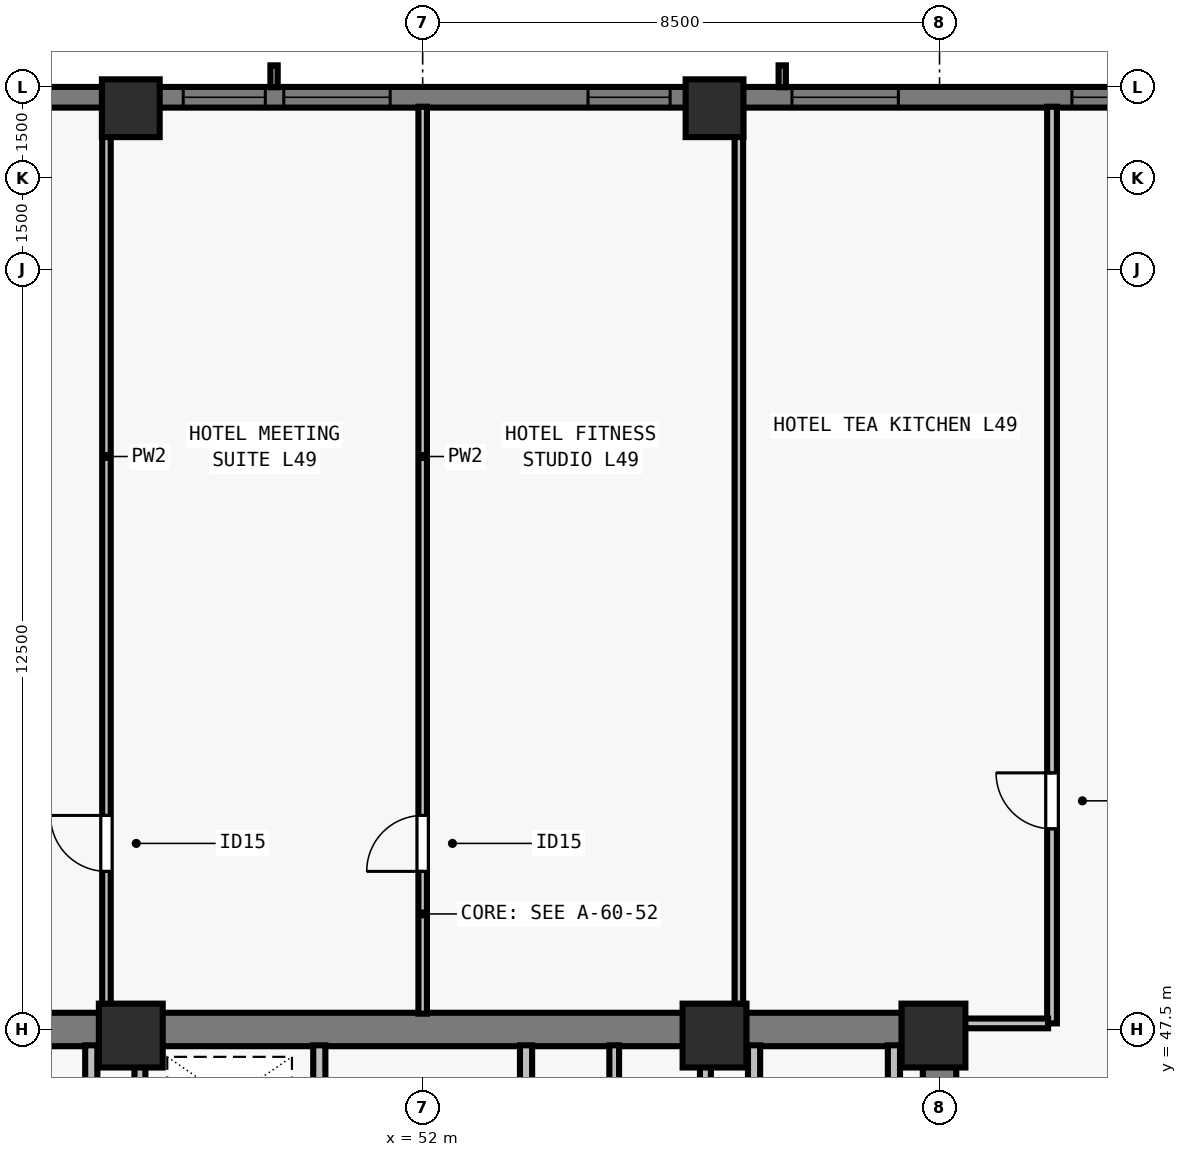
"""IFC4 building model, lengths in metres.
Left out: names, types, materials, properties, quantities, classifications, styles, units other than length and angle.
Written with IfcOpenShell. Run it as: python <this file> out.ifc"""

import sys

from ifc_helpers import new_model, si_unit, direction, frame, frame_2d, origin, origin_2d, place, context, subcontext, project, spatial, rectangle, extrude, element, fill, save


model = new_model("IFC4")
c1 = context("Model", 3, precision=1e-05, world=origin(), true_north=direction((0.0, 1.0)))
c2 = subcontext(c1, "Body", "Model", "MODEL_VIEW")
j1 = project(units=[si_unit("LENGTHUNIT", "METRE"), si_unit("PLANEANGLEUNIT", "RADIAN")], contexts=[c1])
p1 = place(None, origin())
s1 = spatial("IfcSite", under=j1, at=p1, CompositionType="ELEMENT")
p2 = place(p1, origin())
s2 = spatial("IfcBuilding", under=s1, at=p2, CompositionType="ELEMENT")
p3 = place(p2, frame((0.0, 0.0, 179.5)))
s3 = spatial("IfcBuildingStorey", under=s2, at=p3, CompositionType="ELEMENT", Elevation=179.5)
for number, where, z_axis, x_axis in (
    (1, (47.2, 47.4, 0.0), (0.0, 0.0, 1.0), (1.0, 0.0, 0.0)),
    (2, (56.8, 47.4, 0.0), (0.0, 0.0, 1.0), (1.0, 0.0, 0.0)),
    (3, (60.4, 47.4, 0.0), (0.0, 0.0, 1.0), (1.0, 0.0, 0.0)),
):
    element("IfcColumn", number, at=place(p3, frame(where, z_axis=z_axis, x_axis=x_axis)), inside=s3, PredefinedType="COLUMN", context=c2, shape_type="SweptSolid", body=[
        extrude(rectangle(XDim=1.05, YDim=1.05, at=origin_2d()), origin(), (0.0, 0.0, 1.0), 3.5),
    ])
for number, where, z_axis, x_axis in (
    (4, (56.8, 62.65, 0.0), (0.0, 0.0, 1.0), (1.0, 0.0, 0.0)),
    (5, (47.2, 62.65, 0.0), (0.0, 0.0, 1.0), (1.0, 0.0, 0.0)),
):
    element("IfcColumn", number, at=place(p3, frame(where, z_axis=z_axis, x_axis=x_axis)), inside=s3, PredefinedType="COLUMN", context=c2, shape_type="SweptSolid", body=[
        extrude(rectangle(XDim=0.95, YDim=0.95, at=origin_2d()), origin(), (0.0, 0.0, 1.0), 3.5),
    ])
p4 = place(p3, frame((32.0, 62.83, 0.0), z_axis=(0.0, 0.0, 1.0), x_axis=(1.0, 0.0, 0.0)))
e6 = element("IfcWall", 6, at=p4, inside=s3, PredefinedType="SOLIDWALL", context=c2, shape_type="SweptSolid", body=[
    extrude(rectangle(XDim=39.682, YDim=0.34, at=frame_2d((19.841, 0.0))), origin(), (0.0, 0.0, 1.0), 3.28),
])
p5 = place(p4, frame((3.902, 0.0, 0.8)))
e7 = element("IfcOpeningElement", 7, at=p5, cuts=e6, PredefinedType="OPENING", context=c2, shape_type="SweptSolid", body=[
    extrude(rectangle(XDim=1.75, YDim=1.66, at=frame_2d((0.875, 0.83))), frame((0.0, 0.18, 0.0), z_axis=(0.0, -1.0, 0.0), x_axis=(1.0, 0.0, 0.0)), (0.0, 0.0, 1.0), 0.36),
])
p6 = place(p4, frame((8.505, 0.0, 0.8)))
e8 = element("IfcOpeningElement", 8, at=p6, cuts=e6, PredefinedType="OPENING", context=c2, shape_type="SweptSolid", body=[
    extrude(rectangle(XDim=1.35, YDim=1.66, at=frame_2d((0.675, 0.83))), frame((0.0, 0.18, 0.0), z_axis=(0.0, -1.0, 0.0), x_axis=(1.0, 0.0, 0.0)), (0.0, 0.0, 1.0), 0.36),
])
p7 = place(p4, frame((11.859, 0.0, 0.8)))
e9 = element("IfcOpeningElement", 9, at=p7, cuts=e6, PredefinedType="OPENING", context=c2, shape_type="SweptSolid", body=[
    extrude(rectangle(XDim=1.75, YDim=1.66, at=frame_2d((0.875, 0.83))), frame((0.0, 0.18, 0.0), z_axis=(0.0, -1.0, 0.0), x_axis=(1.0, 0.0, 0.0)), (0.0, 0.0, 1.0), 0.36),
])
p8 = place(p4, frame((16.062, 0.0, 0.8)))
e10 = element("IfcOpeningElement", 10, at=p8, cuts=e6, PredefinedType="OPENING", context=c2, shape_type="SweptSolid", body=[
    extrude(rectangle(XDim=1.35, YDim=1.66, at=frame_2d((0.675, 0.83))), frame((0.0, 0.18, 0.0), z_axis=(0.0, -1.0, 0.0), x_axis=(1.0, 0.0, 0.0)), (0.0, 0.0, 1.0), 0.36),
])
p9 = place(p4, frame((17.716, 0.0, 0.8)))
e11 = element("IfcOpeningElement", 11, at=p9, cuts=e6, PredefinedType="OPENING", context=c2, shape_type="SweptSolid", body=[
    extrude(rectangle(XDim=1.75, YDim=1.66, at=frame_2d((0.875, 0.83))), frame((0.0, 0.18, 0.0), z_axis=(0.0, -1.0, 0.0), x_axis=(1.0, 0.0, 0.0)), (0.0, 0.0, 1.0), 0.36),
])
p10 = place(p4, frame((22.719, 0.0, 0.8)))
e12 = element("IfcOpeningElement", 12, at=p10, cuts=e6, PredefinedType="OPENING", context=c2, shape_type="SweptSolid", body=[
    extrude(rectangle(XDim=1.35, YDim=1.66, at=frame_2d((0.675, 0.83))), frame((0.0, 0.18, 0.0), z_axis=(0.0, -1.0, 0.0), x_axis=(1.0, 0.0, 0.0)), (0.0, 0.0, 1.0), 0.36),
])
p11 = place(p4, frame((26.073, 0.0, 0.8)))
e13 = element("IfcOpeningElement", 13, at=p11, cuts=e6, PredefinedType="OPENING", context=c2, shape_type="SweptSolid", body=[
    extrude(rectangle(XDim=1.75, YDim=1.66, at=frame_2d((0.875, 0.83))), frame((0.0, 0.18, 0.0), z_axis=(0.0, -1.0, 0.0), x_axis=(1.0, 0.0, 0.0)), (0.0, 0.0, 1.0), 0.36),
])
p12 = place(p4, frame((30.677, 0.0, 0.8)))
e14 = element("IfcOpeningElement", 14, at=p12, cuts=e6, PredefinedType="OPENING", context=c2, shape_type="SweptSolid", body=[
    extrude(rectangle(XDim=1.35, YDim=1.66, at=frame_2d((0.675, 0.83))), frame((0.0, 0.18, 0.0), z_axis=(0.0, -1.0, 0.0), x_axis=(1.0, 0.0, 0.0)), (0.0, 0.0, 1.0), 0.36),
])
p13 = place(p4, frame((33.18, 0.0, 0.8)))
e15 = element("IfcOpeningElement", 15, at=p13, cuts=e6, PredefinedType="OPENING", context=c2, shape_type="SweptSolid", body=[
    extrude(rectangle(XDim=1.75, YDim=1.66, at=frame_2d((0.875, 0.83))), frame((0.0, 0.18, 0.0), z_axis=(0.0, -1.0, 0.0), x_axis=(1.0, 0.0, 0.0)), (0.0, 0.0, 1.0), 0.36),
])
p14 = place(p3, frame((43.225, 47.5, 0.0), z_axis=(0.0, 0.0, 1.0), x_axis=(1.0, 0.0, 0.0)))
e16 = element("IfcWall", 16, at=p14, inside=s3, PredefinedType="SHEAR", context=c2, shape_type="SweptSolid", body=[
    extrude(rectangle(XDim=17.55, YDim=0.55, at=frame_2d((8.775, 0.0))), origin(), (0.0, 0.0, 1.0), 3.28),
])
p15 = place(p3, frame((60.5, 40.8, 0.0), z_axis=(0.0, 0.0, 1.0), x_axis=(0.0, 1.0, 0.0)))
e17 = element("IfcWall", 17, at=p15, inside=s3, PredefinedType="SHEAR", context=c2, shape_type="SweptSolid", body=[
    extrude(rectangle(XDim=6.435, YDim=0.55, at=frame_2d((3.218, 0.0))), origin(), (0.0, 0.0, 1.0), 3.28),
])
p16 = place(p3, frame((50.3, 40.585, 0.0), z_axis=(0.0, 0.0, 1.0), x_axis=(0.0, 1.0, 0.0)))
e18 = element("IfcWall", 18, at=p16, inside=s3, PredefinedType="SOLIDWALL", context=c2, shape_type="SweptSolid", body=[
    extrude(rectangle(XDim=6.655, YDim=0.2, at=frame_2d((3.328, 0.0))), origin(), (0.0, 0.0, 1.0), 3.28),
])
p17 = place(p16, frame((5.065, 0.0, 0.0)))
e19 = element("IfcOpeningElement", 19, at=p17, cuts=e18, PredefinedType="OPENING", context=c2, shape_type="SweptSolid", body=[
    extrude(rectangle(XDim=0.8, YDim=2.08, at=frame_2d((0.4, 1.04))), frame((0.0, 0.11, 0.0), z_axis=(0.0, -1.0, 0.0), x_axis=(1.0, 0.0, 0.0)), (0.0, 0.0, 1.0), 0.22),
])
p18 = place(p3, frame((53.7, 40.585, 0.0), z_axis=(0.0, 0.0, 1.0), x_axis=(0.0, 1.0, 0.0)))
e20 = element("IfcWall", 20, at=p18, inside=s3, PredefinedType="SOLIDWALL", context=c2, shape_type="SweptSolid", body=[
    extrude(rectangle(XDim=6.655, YDim=0.2, at=frame_2d((3.328, 0.0))), origin(), (0.0, 0.0, 1.0), 3.28),
])
p19 = place(p18, frame((0.195, 0.0, 0.0)))
e21 = element("IfcOpeningElement", 21, at=p19, cuts=e20, PredefinedType="OPENING", context=c2, shape_type="SweptSolid", body=[
    extrude(rectangle(XDim=0.8, YDim=2.08, at=frame_2d((0.4, 1.04))), frame((0.0, 0.11, 0.0), z_axis=(0.0, -1.0, 0.0), x_axis=(1.0, 0.0, 0.0)), (0.0, 0.0, 1.0), 0.22),
])
p20 = place(p18, frame((4.265, 0.0, 0.0)))
e22 = element("IfcOpeningElement", 22, at=p20, cuts=e20, PredefinedType="OPENING", context=c2, shape_type="SweptSolid", body=[
    extrude(rectangle(XDim=0.95, YDim=2.12, at=frame_2d((0.475, 1.06))), frame((0.0, 0.11, 0.0), z_axis=(0.0, -1.0, 0.0), x_axis=(1.0, 0.0, 0.0)), (0.0, 0.0, 1.0), 0.22),
])
for number, where, z_axis, x_axis in (
    (23, (46.55, 43.735, 0.0), (0.0, 0.0, 1.0), (0.0, 1.0, 0.0)),
    (24, (57.45, 43.735, 0.0), (0.0, 0.0, 1.0), (0.0, 1.0, 0.0)),
    (25, (59.75, 43.735, 0.0), (0.0, 0.0, 1.0), (0.0, 1.0, 0.0)),
):
    element("IfcWall", number, at=place(p3, frame(where, z_axis=z_axis, x_axis=x_axis)), inside=s3, PredefinedType="SOLIDWALL", context=c2, shape_type="SweptSolid", body=[
        extrude(rectangle(XDim=3.505, YDim=0.2, at=frame_2d((1.752, 0.0))), origin(), (0.0, 0.0, 1.0), 3.28),
    ])
for number, where, z_axis, x_axis in (
    (26, (47.35, 43.735, 0.0), (0.0, 0.0, 1.0), (0.0, 1.0, 0.0)),
    (27, (56.65, 43.735, 0.0), (0.0, 0.0, 1.0), (0.0, 1.0, 0.0)),
):
    element("IfcWall", number, at=place(p3, frame(where, z_axis=z_axis, x_axis=x_axis)), inside=s3, PredefinedType="SOLIDWALL", context=c2, shape_type="SweptSolid", body=[
        extrude(rectangle(XDim=3.505, YDim=0.18, at=frame_2d((1.752, 0.0))), origin(), (0.0, 0.0, 1.0), 3.28),
    ])
p21 = place(p3, frame((55.15, 44.195, 0.0), z_axis=(0.0, 0.0, 1.0), x_axis=(0.0, 1.0, 0.0)))
e28 = element("IfcWall", 28, at=p21, inside=s3, PredefinedType="PARTITIONING", context=c2, shape_type="SweptSolid", body=[
    extrude(rectangle(XDim=3.045, YDim=0.16, at=frame_2d((1.522, 0.0))), origin(), (0.0, 0.0, 1.0), 3.28),
])
p22 = place(p21, frame((1.025, 0.0, 0.0)))
e29 = element("IfcOpeningElement", 29, at=p22, cuts=e28, PredefinedType="OPENING", context=c2, shape_type="SweptSolid", body=[
    extrude(rectangle(XDim=0.8, YDim=2.1, at=frame_2d((0.4, 1.05))), frame((0.0, 0.09, 0.0), z_axis=(0.0, -1.0, 0.0), x_axis=(1.0, 0.0, 0.0)), (0.0, 0.0, 1.0), 0.18),
])
p23 = place(p3, frame((62.35, 47.6, 0.0), z_axis=(0.0, 0.0, 1.0), x_axis=(0.0, 1.0, 0.0)))
e30 = element("IfcWall", 30, at=p23, inside=s3, PredefinedType="PARTITIONING", context=c2, shape_type="SweptSolid", body=[
    extrude(rectangle(XDim=15.075, YDim=0.16, at=frame_2d((7.538, 0.0))), origin(), (0.0, 0.0, 1.0), 2.555),
])
p24 = place(p23, frame((3.2, 0.0, 0.0)))
e31 = element("IfcOpeningElement", 31, at=p24, cuts=e30, PredefinedType="OPENING", context=c2, shape_type="SweptSolid", body=[
    extrude(rectangle(XDim=0.92, YDim=2.12, at=frame_2d((0.46, 1.06))), frame((0.0, 0.09, 0.0), z_axis=(0.0, -1.0, 0.0), x_axis=(1.0, 0.0, 0.0)), (0.0, 0.0, 1.0), 0.18),
])
p25 = place(p3, frame((60.765, 47.6, 0.0), z_axis=(0.0, 0.0, 1.0), x_axis=(1.0, 0.0, 0.0)))
e32 = element("IfcWall", 32, at=p25, inside=s3, PredefinedType="PARTITIONING", context=c2, shape_type="SweptSolid", body=[
    extrude(rectangle(XDim=1.52, YDim=0.16, at=frame_2d((0.76, 0.0))), origin(), (0.0, 0.0, 1.0), 3.28),
])
p26 = place(p3, frame((46.8, 47.76, 0.0), z_axis=(0.0, 0.0, 1.0), x_axis=(0.0, 1.0, 0.0)))
e33 = element("IfcWall", 33, at=p26, inside=s3, PredefinedType="PARTITIONING", context=c2, shape_type="SweptSolid", body=[
    extrude(rectangle(XDim=14.915, YDim=0.14, at=frame_2d((7.458, 0.0))), origin(), (0.0, 0.0, 1.0), 3.28),
])
p27 = place(p26, frame((2.34, 0.0, 0.0)))
e34 = element("IfcOpeningElement", 34, at=p27, cuts=e33, PredefinedType="OPENING", context=c2, shape_type="SweptSolid", body=[
    extrude(rectangle(XDim=0.92, YDim=2.12, at=frame_2d((0.46, 1.06))), frame((0.0, 0.08, 0.0), z_axis=(0.0, -1.0, 0.0), x_axis=(1.0, 0.0, 0.0)), (0.0, 0.0, 1.0), 0.16),
])
p28 = place(p3, frame((52.0, 47.76, 0.0), z_axis=(0.0, 0.0, 1.0), x_axis=(0.0, 1.0, 0.0)))
e35 = element("IfcWall", 35, at=p28, inside=s3, PredefinedType="PARTITIONING", context=c2, shape_type="SweptSolid", body=[
    extrude(rectangle(XDim=14.915, YDim=0.14, at=frame_2d((7.458, 0.0))), origin(), (0.0, 0.0, 1.0), 2.896),
])
p29 = place(p28, frame((2.34, 0.0, 0.0)))
e36 = element("IfcOpeningElement", 36, at=p29, cuts=e35, PredefinedType="OPENING", context=c2, shape_type="SweptSolid", body=[
    extrude(rectangle(XDim=0.92, YDim=2.12, at=frame_2d((0.46, 1.06))), frame((0.0, 0.08, 0.0), z_axis=(0.0, -1.0, 0.0), x_axis=(1.0, 0.0, 0.0)), (0.0, 0.0, 1.0), 0.16),
])
p30 = place(p3, frame((57.2, 47.76, 0.0), z_axis=(0.0, 0.0, 1.0), x_axis=(0.0, 1.0, 0.0)))
e37 = element("IfcWall", 37, at=p30, inside=s3, PredefinedType="PARTITIONING", context=c2, shape_type="SweptSolid", body=[
    extrude(rectangle(XDim=14.915, YDim=0.14, at=frame_2d((7.458, 0.0))), origin(), (0.0, 0.0, 1.0), 3.28),
])
p31 = place(p8, origin())
e38 = element("IfcWindow", 38, at=p31, inside=s3, PartitioningType="SINGLE_PANEL", PredefinedType="WINDOW", context=c2, shape_type="SweptSolid", body=[
    extrude(rectangle(XDim=1.35, YDim=1.66, at=frame_2d((0.675, 0.83))), frame((0.0, -0.05, 0.0), z_axis=(0.0, -1.0, 0.0), x_axis=(1.0, 0.0, 0.0)), (0.0, 0.0, 1.0), 0.06),
])
fill(e10, e38)
p32 = place(p9, origin())
e39 = element("IfcWindow", 39, at=p32, inside=s3, PartitioningType="SINGLE_PANEL", PredefinedType="WINDOW", context=c2, shape_type="SweptSolid", body=[
    extrude(rectangle(XDim=1.75, YDim=1.66, at=frame_2d((0.875, 0.83))), frame((0.0, -0.05, 0.0), z_axis=(0.0, -1.0, 0.0), x_axis=(1.0, 0.0, 0.0)), (0.0, 0.0, 1.0), 0.06),
])
fill(e11, e39)
p33 = place(p10, origin())
e40 = element("IfcWindow", 40, at=p33, inside=s3, PartitioningType="SINGLE_PANEL", PredefinedType="WINDOW", context=c2, shape_type="SweptSolid", body=[
    extrude(rectangle(XDim=1.35, YDim=1.66, at=frame_2d((0.675, 0.83))), frame((0.0, -0.05, 0.0), z_axis=(0.0, -1.0, 0.0), x_axis=(1.0, 0.0, 0.0)), (0.0, 0.0, 1.0), 0.06),
])
fill(e12, e40)
p34 = place(p11, origin())
e41 = element("IfcWindow", 41, at=p34, inside=s3, PartitioningType="SINGLE_PANEL", PredefinedType="WINDOW", context=c2, shape_type="SweptSolid", body=[
    extrude(rectangle(XDim=1.75, YDim=1.66, at=frame_2d((0.875, 0.83))), frame((0.0, -0.05, 0.0), z_axis=(0.0, -1.0, 0.0), x_axis=(1.0, 0.0, 0.0)), (0.0, 0.0, 1.0), 0.06),
])
fill(e13, e41)
p35 = place(p12, origin())
e42 = element("IfcWindow", 42, at=p35, inside=s3, PartitioningType="SINGLE_PANEL", PredefinedType="WINDOW", context=c2, shape_type="SweptSolid", body=[
    extrude(rectangle(XDim=1.35, YDim=1.66, at=frame_2d((0.675, 0.83))), frame((0.0, -0.05, 0.0), z_axis=(0.0, -1.0, 0.0), x_axis=(1.0, 0.0, 0.0)), (0.0, 0.0, 1.0), 0.06),
])
fill(e14, e42)
p36 = place(p27, origin())
e43 = element("IfcDoor", 43, at=p36, inside=s3, OperationType="SINGLE_SWING_RIGHT", PredefinedType="DOOR", context=c2, shape_type="SweptSolid", body=[
    extrude(rectangle(XDim=0.92, YDim=2.12, at=frame_2d((0.46, 1.06))), frame((0.0, 0.025, 0.0), z_axis=(0.0, -1.0, 0.0), x_axis=(1.0, 0.0, 0.0)), (0.0, 0.0, 1.0), 0.05),
])
fill(e34, e43)
p37 = place(p29, origin())
e44 = element("IfcDoor", 44, at=p37, inside=s3, OperationType="SINGLE_SWING_LEFT", PredefinedType="DOOR", context=c2, shape_type="SweptSolid", body=[
    extrude(rectangle(XDim=0.92, YDim=2.12, at=frame_2d((0.46, 1.06))), frame((0.0, 0.025, 0.0), z_axis=(0.0, -1.0, 0.0), x_axis=(1.0, 0.0, 0.0)), (0.0, 0.0, 1.0), 0.05),
])
fill(e36, e44)
p38 = place(p24, origin())
e45 = element("IfcDoor", 45, at=p38, inside=s3, OperationType="SINGLE_SWING_RIGHT", PredefinedType="DOOR", context=c2, shape_type="SweptSolid", body=[
    extrude(rectangle(XDim=0.92, YDim=2.12, at=frame_2d((0.46, 1.06))), frame((0.0, 0.025, 0.0), z_axis=(0.0, -1.0, 0.0), x_axis=(1.0, 0.0, 0.0)), (0.0, 0.0, 1.0), 0.05),
])
fill(e31, e45)
save(model, sys.argv[1])
